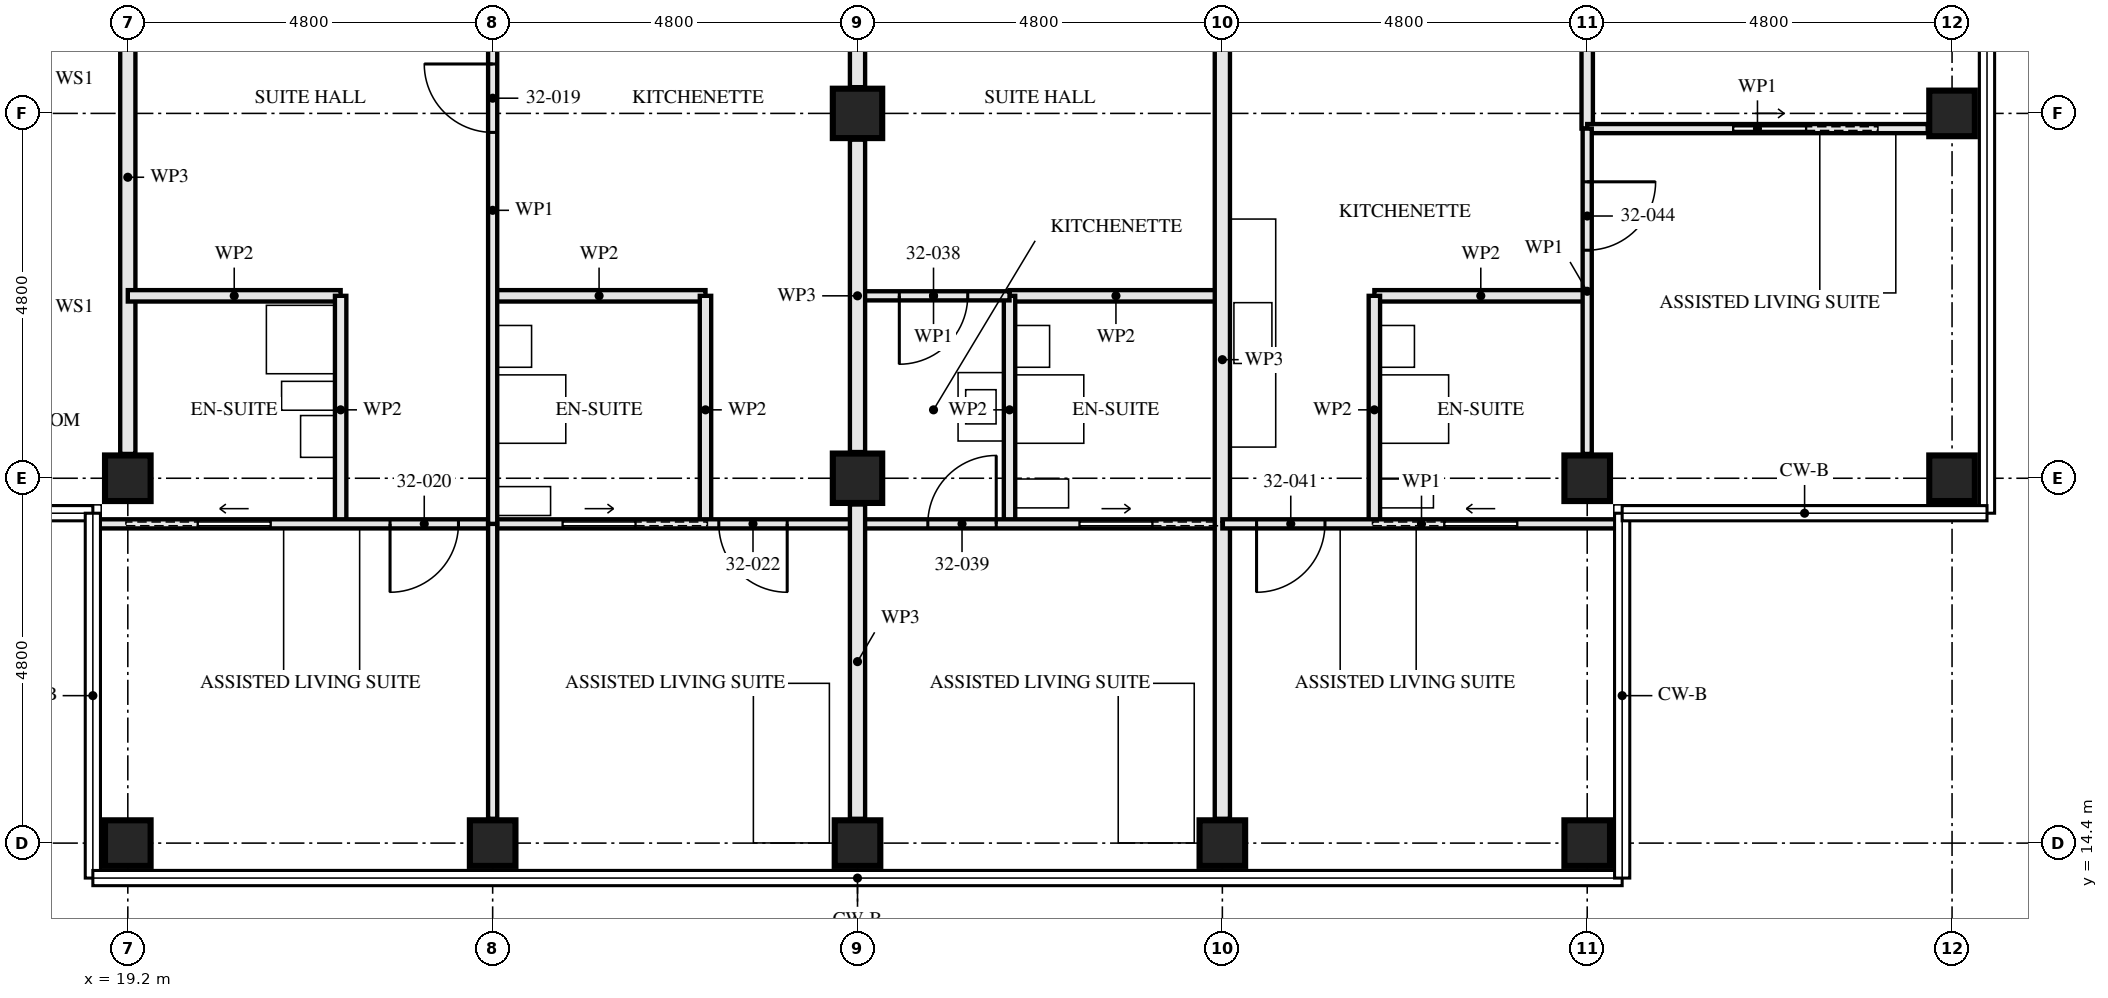
"""IFC4 building model, lengths in metres.
Left out: names, types, materials, properties, quantities, classifications, styles, units other than length and angle.
Written with IfcOpenShell. Run it as: python <this file> out.ifc"""

import sys

from ifc_helpers import new_model, si_unit, direction, frame, frame_2d, origin, origin_2d, place, context, subcontext, project, spatial, rectangle, hollow_rectangle, extrude, element, fill, save


model = new_model("IFC4")
c1 = context("Model", 3, precision=1e-05, world=origin(), true_north=direction((0.0, 1.0)))
c2 = subcontext(c1, "Body", "Model", "MODEL_VIEW")
j1 = project(units=[si_unit("LENGTHUNIT", "METRE"), si_unit("PLANEANGLEUNIT", "RADIAN")], contexts=[c1])
p1 = place(None, origin())
s1 = spatial("IfcSite", under=j1, at=p1, CompositionType="ELEMENT")
p2 = place(p1, origin())
s2 = spatial("IfcBuilding", under=s1, at=p2, CompositionType="ELEMENT")
p3 = place(p2, frame((0.0, 0.0, 119.0)))
s3 = spatial("IfcBuildingStorey", under=s2, at=p3, CompositionType="ELEMENT", Elevation=119.0)
for number, where, z_axis, x_axis in (
    (1, (19.2, 14.4, 0.0), (0.0, 0.0, 1.0), (0.0, 1.0, 0.0)),
    (2, (19.2, 19.2, 0.0), (0.0, 0.0, 1.0), (0.0, 1.0, 0.0)),
    (3, (24.0, 14.4, 0.0), (0.0, 0.0, 1.0), (0.0, 1.0, 0.0)),
    (4, (28.8, 14.4, 0.0), (0.0, 0.0, 1.0), (0.0, 1.0, 0.0)),
):
    element("IfcColumn", number, at=place(p3, frame(where, z_axis=z_axis, x_axis=x_axis)), inside=s3, PredefinedType="COLUMN", context=c2, shape_type="SweptSolid", body=[
        extrude(hollow_rectangle(XDim=0.6, YDim=0.6, WallThickness=0.08, at=origin_2d()), origin(), (0.0, 0.0, 1.0), 3.5),
    ])
for number, where, z_axis, x_axis in (
    (5, (28.8, 19.2, 0.0), (0.0, 0.0, 1.0), (1.0, 0.0, 0.0)),
    (6, (28.8, 24.0, 0.0), (0.0, 0.0, 1.0), (1.0, 0.0, 0.0)),
):
    element("IfcColumn", number, at=place(p3, frame(where, z_axis=z_axis, x_axis=x_axis)), inside=s3, PredefinedType="COLUMN", context=c2, shape_type="SweptSolid", body=[
        extrude(hollow_rectangle(XDim=0.65, YDim=0.65, WallThickness=0.05, at=origin_2d()), origin(), (0.0, 0.0, 1.0), 3.5),
    ])
for number, where, z_axis, x_axis in (
    (7, (33.6, 14.4, 0.0), (0.0, 0.0, 1.0), (0.0, 1.0, 0.0)),
    (8, (38.4, 14.4, 0.0), (0.0, 0.0, 1.0), (0.0, 1.0, 0.0)),
    (9, (38.4, 19.2, 0.0), (0.0, 0.0, 1.0), (0.0, 1.0, 0.0)),
    (10, (43.2, 19.2, 0.0), (0.0, 0.0, 1.0), (0.0, 1.0, 0.0)),
    (11, (43.2, 24.0, 0.0), (0.0, 0.0, 1.0), (1.0, 0.0, 0.0)),
):
    element("IfcColumn", number, at=place(p3, frame(where, z_axis=z_axis, x_axis=x_axis)), inside=s3, PredefinedType="COLUMN", context=c2, shape_type="SweptSolid", body=[
        extrude(hollow_rectangle(XDim=0.6, YDim=0.6, WallThickness=0.08, at=origin_2d()), origin(), (0.0, 0.0, 1.0), 3.5),
    ])
p4 = place(p3, frame((19.2, 19.52, 0.0), z_axis=(0.0, 0.0, 1.0), x_axis=(0.0, 1.0, 0.0)))
e12 = element("IfcWall", 12, at=p4, inside=s3, PredefinedType="PARTITIONING", context=c2, shape_type="SweptSolid", body=[
    extrude(rectangle(XDim=7.28, YDim=0.2, at=frame_2d((3.64, 0.0))), origin(), (0.0, 0.0, 1.0), 2.55),
])
p5 = place(p3, frame((22.0, 18.6, 0.0), z_axis=(0.0, 0.0, 1.0), x_axis=(0.0, 1.0, 0.0)))
e13 = element("IfcWall", 13, at=p5, inside=s3, PredefinedType="PARTITIONING", context=c2, shape_type="SweptSolid", body=[
    extrude(rectangle(XDim=3.0, YDim=0.15, at=frame_2d((1.5, 0.0))), origin(), (0.0, 0.0, 1.0), 2.55),
])
p6 = place(p3, frame((19.2, 21.6, 0.0), z_axis=(0.0, 0.0, 1.0), x_axis=(1.0, 0.0, 0.0)))
e14 = element("IfcWall", 14, at=p6, inside=s3, PredefinedType="PARTITIONING", context=c2, shape_type="SweptSolid", body=[
    extrude(rectangle(XDim=2.8, YDim=0.15, at=frame_2d((1.4, 0.0))), origin(), (0.0, 0.0, 1.0), 3.33),
])
p7 = place(p3, frame((26.8, 18.6, 0.0), z_axis=(0.0, 0.0, 1.0), x_axis=(0.0, 1.0, 0.0)))
e15 = element("IfcWall", 15, at=p7, inside=s3, PredefinedType="PARTITIONING", context=c2, shape_type="SweptSolid", body=[
    extrude(rectangle(XDim=3.0, YDim=0.15, at=frame_2d((1.5, 0.0))), origin(), (0.0, 0.0, 1.0), 2.55),
])
p8 = place(p3, frame((24.0, 21.6, 0.0), z_axis=(0.0, 0.0, 1.0), x_axis=(1.0, 0.0, 0.0)))
e16 = element("IfcWall", 16, at=p8, inside=s3, PredefinedType="PARTITIONING", context=c2, shape_type="SweptSolid", body=[
    extrude(rectangle(XDim=2.8, YDim=0.15, at=frame_2d((1.4, 0.0))), origin(), (0.0, 0.0, 1.0), 3.33),
])
p9 = place(p3, frame((24.0, 18.6, 0.0), z_axis=(0.0, 0.0, 1.0), x_axis=(0.0, 1.0, 0.0)))
e17 = element("IfcWall", 17, at=p9, inside=s3, PredefinedType="PARTITIONING", context=c2, shape_type="SweptSolid", body=[
    extrude(rectangle(XDim=8.25, YDim=0.12, at=frame_2d((4.125, 0.0))), origin(), (0.0, 0.0, 1.0), 2.55),
])
p10 = place(p9, frame((5.15, 0.0, 0.0)))
e18 = element("IfcOpeningElement", 18, at=p10, cuts=e17, PredefinedType="OPENING", context=c2, shape_type="SweptSolid", body=[
    extrude(rectangle(XDim=0.9, YDim=2.1, at=frame_2d((0.45, 1.05))), frame((0.0, 0.071, 0.0), z_axis=(0.0, -1.0, 0.0), x_axis=(1.0, 0.0, 0.0)), (0.0, 0.0, 1.0), 0.141),
])
p11 = place(p3, frame((18.76, 18.6, 0.0), z_axis=(0.0, 0.0, 1.0), x_axis=(1.0, 0.0, 0.0)))
e19 = element("IfcWall", 19, at=p11, inside=s3, PredefinedType="PARTITIONING", context=c2, shape_type="SweptSolid", body=[
    extrude(rectangle(XDim=5.24, YDim=0.12, at=frame_2d((2.62, 0.0))), origin(), (0.0, 0.0, 1.0), 2.32),
])
p12 = place(p11, frame((3.89, 0.0, 0.0)))
e20 = element("IfcOpeningElement", 20, at=p12, cuts=e19, PredefinedType="OPENING", context=c2, shape_type="SweptSolid", body=[
    extrude(rectangle(XDim=0.9, YDim=2.1, at=frame_2d((0.45, 1.05))), frame((0.0, 0.071, 0.0), z_axis=(0.0, -1.0, 0.0), x_axis=(1.0, 0.0, 0.0)), (0.0, 0.0, 1.0), 0.141),
])
p13 = place(p11, frame((1.365, 0.0, 0.0)))
e21 = element("IfcOpeningElement", 21, at=p13, cuts=e19, PredefinedType="OPENING", context=c2, shape_type="SweptSolid", body=[
    extrude(rectangle(XDim=0.95, YDim=2.1, at=frame_2d((0.475, 1.05))), frame((0.0, 0.071, 0.0), z_axis=(0.0, -1.0, 0.0), x_axis=(1.0, 0.0, 0.0)), (0.0, 0.0, 1.0), 0.141),
])
p14 = place(p3, frame((24.0, 18.6, 0.0), z_axis=(0.0, 0.0, 1.0), x_axis=(1.0, 0.0, 0.0)))
e22 = element("IfcWall", 22, at=p14, inside=s3, PredefinedType="PARTITIONING", context=c2, shape_type="SweptSolid", body=[
    extrude(rectangle(XDim=4.8, YDim=0.12, at=frame_2d((2.4, 0.0))), origin(), (0.0, 0.0, 1.0), 3.33),
])
p15 = place(p14, frame((2.975, 0.0, 0.0)))
e23 = element("IfcOpeningElement", 23, at=p15, cuts=e22, PredefinedType="OPENING", context=c2, shape_type="SweptSolid", body=[
    extrude(rectangle(XDim=0.9, YDim=2.1, at=frame_2d((0.45, 1.05))), frame((0.0, 0.071, 0.0), z_axis=(0.0, -1.0, 0.0), x_axis=(1.0, 0.0, 0.0)), (0.0, 0.0, 1.0), 0.141),
])
p16 = place(p14, frame((0.925, 0.0, 0.0)))
e24 = element("IfcOpeningElement", 24, at=p16, cuts=e22, PredefinedType="OPENING", context=c2, shape_type="SweptSolid", body=[
    extrude(rectangle(XDim=0.95, YDim=2.1, at=frame_2d((0.475, 1.05))), frame((0.0, 0.071, 0.0), z_axis=(0.0, -1.0, 0.0), x_axis=(1.0, 0.0, 0.0)), (0.0, 0.0, 1.0), 0.141),
])
p17 = place(p3, frame((24.0, 14.72, 0.0), z_axis=(0.0, 0.0, 1.0), x_axis=(0.0, 1.0, 0.0)))
e25 = element("IfcWall", 25, at=p17, inside=s3, PredefinedType="PARTITIONING", context=c2, shape_type="SweptSolid", body=[
    extrude(rectangle(XDim=3.88, YDim=0.12, at=frame_2d((1.94, 0.0))), origin(), (0.0, 0.0, 1.0), 3.33),
])
p18 = place(p3, frame((30.8, 18.6, 0.0), z_axis=(0.0, 0.0, 1.0), x_axis=(0.0, 1.0, 0.0)))
e26 = element("IfcWall", 26, at=p18, inside=s3, PredefinedType="PARTITIONING", context=c2, shape_type="SweptSolid", body=[
    extrude(rectangle(XDim=3.0, YDim=0.15, at=frame_2d((1.5, 0.0))), origin(), (0.0, 0.0, 1.0), 2.55),
])
p19 = place(p3, frame((30.8, 21.6, 0.0), z_axis=(0.0, 0.0, 1.0), x_axis=(1.0, 0.0, 0.0)))
e27 = element("IfcWall", 27, at=p19, inside=s3, PredefinedType="PARTITIONING", context=c2, shape_type="SweptSolid", body=[
    extrude(rectangle(XDim=2.8, YDim=0.15, at=frame_2d((1.4, 0.0))), origin(), (0.0, 0.0, 1.0), 3.33),
])
p20 = place(p3, frame((28.8, 21.6, 0.0), z_axis=(0.0, 0.0, 1.0), x_axis=(1.0, 0.0, 0.0)))
e28 = element("IfcWall", 28, at=p20, inside=s3, PredefinedType="PARTITIONING", context=c2, shape_type="SweptSolid", body=[
    extrude(rectangle(XDim=2.0, YDim=0.12, at=frame_2d((1.0, 0.0))), origin(), (0.0, 0.0, 1.0), 3.33),
])
p21 = place(p20, frame((0.55, 0.0, 0.0)))
e29 = element("IfcOpeningElement", 29, at=p21, cuts=e28, PredefinedType="OPENING", context=c2, shape_type="SweptSolid", body=[
    extrude(rectangle(XDim=0.9, YDim=2.1, at=frame_2d((0.45, 1.05))), frame((0.0, 0.071, 0.0), z_axis=(0.0, -1.0, 0.0), x_axis=(1.0, 0.0, 0.0)), (0.0, 0.0, 1.0), 0.141),
])
p22 = place(p3, frame((28.8, 18.6, 0.0), z_axis=(0.0, 0.0, 1.0), x_axis=(1.0, 0.0, 0.0)))
e30 = element("IfcWall", 30, at=p22, inside=s3, PredefinedType="PARTITIONING", context=c2, shape_type="SweptSolid", body=[
    extrude(rectangle(XDim=4.8, YDim=0.12, at=frame_2d((2.4, 0.0))), origin(), (0.0, 0.0, 1.0), 3.33),
])
p23 = place(p22, frame((0.925, 0.0, 0.0)))
e31 = element("IfcOpeningElement", 31, at=p23, cuts=e30, PredefinedType="OPENING", context=c2, shape_type="SweptSolid", body=[
    extrude(rectangle(XDim=0.9, YDim=2.1, at=frame_2d((0.45, 1.05))), frame((0.0, 0.071, 0.0), z_axis=(0.0, -1.0, 0.0), x_axis=(1.0, 0.0, 0.0)), (0.0, 0.0, 1.0), 0.141),
])
p24 = place(p22, frame((2.925, 0.0, 0.0)))
e32 = element("IfcOpeningElement", 32, at=p24, cuts=e30, PredefinedType="OPENING", context=c2, shape_type="SweptSolid", body=[
    extrude(rectangle(XDim=0.95, YDim=2.1, at=frame_2d((0.475, 1.05))), frame((0.0, 0.071, 0.0), z_axis=(0.0, -1.0, 0.0), x_axis=(1.0, 0.0, 0.0)), (0.0, 0.0, 1.0), 0.141),
])
p25 = place(p3, frame((33.6, 14.72, 0.0), z_axis=(0.0, 0.0, 1.0), x_axis=(0.0, 1.0, 0.0)))
e33 = element("IfcWall", 33, at=p25, inside=s3, PredefinedType="PARTITIONING", context=c2, shape_type="SweptSolid", body=[
    extrude(rectangle(XDim=12.08, YDim=0.2, at=frame_2d((6.04, 0.0))), origin(), (0.0, 0.0, 1.0), 2.55),
])
p26 = place(p3, frame((35.6, 18.6, 0.0), z_axis=(0.0, 0.0, 1.0), x_axis=(0.0, 1.0, 0.0)))
e34 = element("IfcWall", 34, at=p26, inside=s3, PredefinedType="PARTITIONING", context=c2, shape_type="SweptSolid", body=[
    extrude(rectangle(XDim=3.0, YDim=0.15, at=frame_2d((1.5, 0.0))), origin(), (0.0, 0.0, 1.0), 2.55),
])
p27 = place(p3, frame((35.6, 21.6, 0.0), z_axis=(0.0, 0.0, 1.0), x_axis=(1.0, 0.0, 0.0)))
e35 = element("IfcWall", 35, at=p27, inside=s3, PredefinedType="PARTITIONING", context=c2, shape_type="SweptSolid", body=[
    extrude(rectangle(XDim=2.8, YDim=0.15, at=frame_2d((1.4, 0.0))), origin(), (0.0, 0.0, 1.0), 3.33),
])
p28 = place(p3, frame((38.4, 23.8, 0.0), z_axis=(0.0, 0.0, 1.0), x_axis=(0.0, 1.0, 0.0)))
e36 = element("IfcWall", 36, at=p28, inside=s3, PredefinedType="PARTITIONING", context=c2, shape_type="SweptSolid", body=[
    extrude(rectangle(XDim=3.0, YDim=0.15, at=frame_2d((1.5, 0.0))), origin(), (0.0, 0.0, 1.0), 2.55),
])
p29 = place(p3, frame((33.6, 18.6, 0.0), z_axis=(0.0, 0.0, 1.0), x_axis=(1.0, 0.0, 0.0)))
e37 = element("IfcWall", 37, at=p29, inside=s3, PredefinedType="PARTITIONING", context=c2, shape_type="SweptSolid", body=[
    extrude(rectangle(XDim=5.24, YDim=0.12, at=frame_2d((2.62, 0.0))), origin(), (0.0, 0.0, 1.0), 2.32),
])
p30 = place(p29, frame((0.45, 0.0, 0.0)))
e38 = element("IfcOpeningElement", 38, at=p30, cuts=e37, PredefinedType="OPENING", context=c2, shape_type="SweptSolid", body=[
    extrude(rectangle(XDim=0.9, YDim=2.1, at=frame_2d((0.45, 1.05))), frame((0.0, 0.071, 0.0), z_axis=(0.0, -1.0, 0.0), x_axis=(1.0, 0.0, 0.0)), (0.0, 0.0, 1.0), 0.141),
])
p31 = place(p29, frame((2.925, 0.0, 0.0)))
e39 = element("IfcOpeningElement", 39, at=p31, cuts=e37, PredefinedType="OPENING", context=c2, shape_type="SweptSolid", body=[
    extrude(rectangle(XDim=0.95, YDim=2.1, at=frame_2d((0.475, 1.05))), frame((0.0, 0.071, 0.0), z_axis=(0.0, -1.0, 0.0), x_axis=(1.0, 0.0, 0.0)), (0.0, 0.0, 1.0), 0.141),
])
p32 = place(p3, frame((38.4, 23.8, 0.0), z_axis=(0.0, 0.0, 1.0), x_axis=(1.0, 0.0, 0.0)))
e40 = element("IfcWall", 40, at=p32, inside=s3, PredefinedType="PARTITIONING", context=c2, shape_type="SweptSolid", body=[
    extrude(rectangle(XDim=4.48, YDim=0.12, at=frame_2d((2.24, 0.0))), origin(), (0.0, 0.0, 1.0), 3.33),
])
p33 = place(p32, frame((1.925, 0.0, 0.0)))
e41 = element("IfcOpeningElement", 41, at=p33, cuts=e40, PredefinedType="OPENING", context=c2, shape_type="SweptSolid", body=[
    extrude(rectangle(XDim=0.95, YDim=2.1, at=frame_2d((0.475, 1.05))), frame((0.0, 0.071, 0.0), z_axis=(0.0, -1.0, 0.0), x_axis=(1.0, 0.0, 0.0)), (0.0, 0.0, 1.0), 0.141),
])
p34 = place(p3, frame((38.4, 19.52, 0.0), z_axis=(0.0, 0.0, 1.0), x_axis=(0.0, 1.0, 0.0)))
e42 = element("IfcWall", 42, at=p34, inside=s3, PredefinedType="PARTITIONING", context=c2, shape_type="SweptSolid", body=[
    extrude(rectangle(XDim=4.28, YDim=0.12, at=frame_2d((2.14, 0.0))), origin(), (0.0, 0.0, 1.0), 3.33),
])
p35 = place(p34, frame((2.68, 0.0, 0.0)))
e43 = element("IfcOpeningElement", 43, at=p35, cuts=e42, PredefinedType="OPENING", context=c2, shape_type="SweptSolid", body=[
    extrude(rectangle(XDim=0.9, YDim=2.1, at=frame_2d((0.45, 1.05))), frame((0.0, 0.071, 0.0), z_axis=(0.0, -1.0, 0.0), x_axis=(1.0, 0.0, 0.0)), (0.0, 0.0, 1.0), 0.141),
])
p36 = place(p3, frame((28.8, 14.72, 0.0), z_axis=(0.0, 0.0, 1.0), x_axis=(0.0, 1.0, 0.0)))
e44 = element("IfcWall", 44, at=p36, inside=s3, PredefinedType="PARTITIONING", context=c2, shape_type="SweptSolid", body=[
    extrude(rectangle(XDim=4.135, YDim=0.2, at=frame_2d((2.067, 0.0))), origin(), (0.0, 0.0, 1.0), 2.32),
])
p37 = place(p3, frame((28.8, 19.545, 0.0), z_axis=(0.0, 0.0, 1.0), x_axis=(0.0, 1.0, 0.0)))
e45 = element("IfcWall", 45, at=p37, inside=s3, PredefinedType="PARTITIONING", context=c2, shape_type="SweptSolid", body=[
    extrude(rectangle(XDim=4.11, YDim=0.2, at=frame_2d((2.055, 0.0))), origin(), (0.0, 0.0, 1.0), 2.32),
])
p38 = place(p3, frame((28.8, 24.345, 0.0), z_axis=(0.0, 0.0, 1.0), x_axis=(0.0, 1.0, 0.0)))
e46 = element("IfcWall", 46, at=p38, inside=s3, PredefinedType="PARTITIONING", context=c2, shape_type="SweptSolid", body=[
    extrude(rectangle(XDim=2.555, YDim=0.2, at=frame_2d((1.277, 0.0))), origin(), (0.0, 0.0, 1.0), 2.32),
])
p39 = place(p10, origin())
e47 = element("IfcDoor", 47, at=p39, inside=s3, OperationType="SINGLE_SWING_LEFT", PredefinedType="DOOR", context=c2, shape_type="SweptSolid", body=[
    extrude(rectangle(XDim=0.9, YDim=2.1, at=frame_2d((0.45, 1.05))), frame((0.0, 0.022, 0.0), z_axis=(0.0, -1.0, 0.0), x_axis=(1.0, 0.0, 0.0)), (0.0, 0.0, 1.0), 0.044),
])
fill(e18, e47)
p40 = place(p12, frame((0.9, 0.0, 0.0), z_axis=(0.0, 0.0, 1.0), x_axis=(-1.0, 0.0, 0.0)))
e48 = element("IfcDoor", 48, at=p40, inside=s3, OperationType="SINGLE_SWING_LEFT", PredefinedType="DOOR", context=c2, shape_type="SweptSolid", body=[
    extrude(rectangle(XDim=0.9, YDim=2.1, at=frame_2d((0.45, 1.05))), frame((0.0, 0.022, 0.0), z_axis=(0.0, -1.0, 0.0), x_axis=(1.0, 0.0, 0.0)), (0.0, 0.0, 1.0), 0.044),
])
fill(e20, e48)
p41 = place(p13, origin())
e49 = element("IfcDoor", 49, at=p41, inside=s3, OperationType="SLIDING_TO_RIGHT", PredefinedType="DOOR", context=c2, shape_type="SweptSolid", body=[
    extrude(rectangle(XDim=0.95, YDim=2.1, at=frame_2d((0.475, 1.05))), frame((0.0, 0.022, 0.0), z_axis=(0.0, -1.0, 0.0), x_axis=(1.0, 0.0, 0.0)), (0.0, 0.0, 1.0), 0.044),
])
fill(e21, e49)
p42 = place(p15, frame((0.9, 0.0, 0.0), z_axis=(0.0, 0.0, 1.0), x_axis=(-1.0, 0.0, 0.0)))
e50 = element("IfcDoor", 50, at=p42, inside=s3, OperationType="SINGLE_SWING_RIGHT", PredefinedType="DOOR", context=c2, shape_type="SweptSolid", body=[
    extrude(rectangle(XDim=0.9, YDim=2.1, at=frame_2d((0.45, 1.05))), frame((0.0, 0.022, 0.0), z_axis=(0.0, -1.0, 0.0), x_axis=(1.0, 0.0, 0.0)), (0.0, 0.0, 1.0), 0.044),
])
fill(e23, e50)
p43 = place(p16, origin())
e51 = element("IfcDoor", 51, at=p43, inside=s3, OperationType="SLIDING_TO_LEFT", PredefinedType="DOOR", context=c2, shape_type="SweptSolid", body=[
    extrude(rectangle(XDim=0.95, YDim=2.1, at=frame_2d((0.475, 1.05))), frame((0.0, 0.022, 0.0), z_axis=(0.0, -1.0, 0.0), x_axis=(1.0, 0.0, 0.0)), (0.0, 0.0, 1.0), 0.044),
])
fill(e24, e51)
p44 = place(p21, frame((0.9, 0.0, 0.0), z_axis=(0.0, 0.0, 1.0), x_axis=(-1.0, 0.0, 0.0)))
e52 = element("IfcDoor", 52, at=p44, inside=s3, OperationType="SINGLE_SWING_LEFT", PredefinedType="DOOR", context=c2, shape_type="SweptSolid", body=[
    extrude(rectangle(XDim=0.9, YDim=2.1, at=frame_2d((0.45, 1.05))), frame((0.0, 0.022, 0.0), z_axis=(0.0, -1.0, 0.0), x_axis=(1.0, 0.0, 0.0)), (0.0, 0.0, 1.0), 0.044),
])
fill(e29, e52)
p45 = place(p23, origin())
e53 = element("IfcDoor", 53, at=p45, inside=s3, OperationType="SINGLE_SWING_LEFT", PredefinedType="DOOR", context=c2, shape_type="SweptSolid", body=[
    extrude(rectangle(XDim=0.9, YDim=2.1, at=frame_2d((0.45, 1.05))), frame((0.0, 0.022, 0.0), z_axis=(0.0, -1.0, 0.0), x_axis=(1.0, 0.0, 0.0)), (0.0, 0.0, 1.0), 0.044),
])
fill(e31, e53)
p46 = place(p24, origin())
e54 = element("IfcDoor", 54, at=p46, inside=s3, OperationType="SLIDING_TO_LEFT", PredefinedType="DOOR", context=c2, shape_type="SweptSolid", body=[
    extrude(rectangle(XDim=0.95, YDim=2.1, at=frame_2d((0.475, 1.05))), frame((0.0, 0.022, 0.0), z_axis=(0.0, -1.0, 0.0), x_axis=(1.0, 0.0, 0.0)), (0.0, 0.0, 1.0), 0.044),
])
fill(e32, e54)
p47 = place(p30, frame((0.9, 0.0, 0.0), z_axis=(0.0, 0.0, 1.0), x_axis=(-1.0, 0.0, 0.0)))
e55 = element("IfcDoor", 55, at=p47, inside=s3, OperationType="SINGLE_SWING_LEFT", PredefinedType="DOOR", context=c2, shape_type="SweptSolid", body=[
    extrude(rectangle(XDim=0.9, YDim=2.1, at=frame_2d((0.45, 1.05))), frame((0.0, 0.022, 0.0), z_axis=(0.0, -1.0, 0.0), x_axis=(1.0, 0.0, 0.0)), (0.0, 0.0, 1.0), 0.044),
])
fill(e38, e55)
p48 = place(p31, origin())
e56 = element("IfcDoor", 56, at=p48, inside=s3, OperationType="SLIDING_TO_RIGHT", PredefinedType="DOOR", context=c2, shape_type="SweptSolid", body=[
    extrude(rectangle(XDim=0.95, YDim=2.1, at=frame_2d((0.475, 1.05))), frame((0.0, 0.022, 0.0), z_axis=(0.0, -1.0, 0.0), x_axis=(1.0, 0.0, 0.0)), (0.0, 0.0, 1.0), 0.044),
])
fill(e39, e56)
p49 = place(p33, origin())
e57 = element("IfcDoor", 57, at=p49, inside=s3, OperationType="SLIDING_TO_LEFT", PredefinedType="DOOR", context=c2, shape_type="SweptSolid", body=[
    extrude(rectangle(XDim=0.95, YDim=2.1, at=frame_2d((0.475, 1.05))), frame((0.0, 0.022, 0.0), z_axis=(0.0, -1.0, 0.0), x_axis=(1.0, 0.0, 0.0)), (0.0, 0.0, 1.0), 0.044),
])
fill(e41, e57)
p50 = place(p35, frame((0.9, 0.0, 0.0), z_axis=(0.0, 0.0, 1.0), x_axis=(-1.0, 0.0, 0.0)))
e58 = element("IfcDoor", 58, at=p50, inside=s3, OperationType="SINGLE_SWING_RIGHT", PredefinedType="DOOR", context=c2, shape_type="SweptSolid", body=[
    extrude(rectangle(XDim=0.9, YDim=2.1, at=frame_2d((0.45, 1.05))), frame((0.0, 0.022, 0.0), z_axis=(0.0, -1.0, 0.0), x_axis=(1.0, 0.0, 0.0)), (0.0, 0.0, 1.0), 0.044),
])
fill(e43, e58)
save(model, sys.argv[1])
